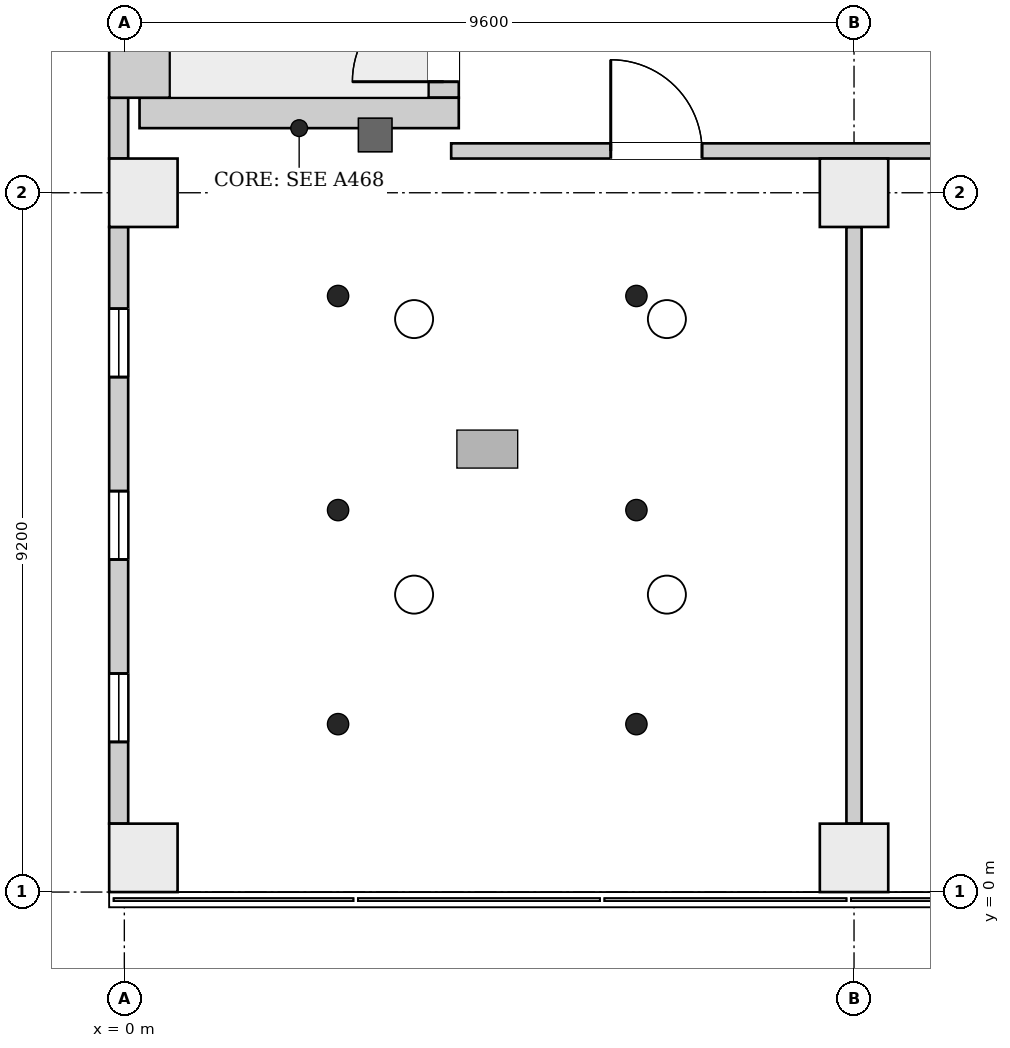
"""IFC4 building model, lengths in metres.
Left out: names, types, materials, properties, quantities, classifications, styles, units other than length and angle.
Written with IfcOpenShell. Run it as: python <this file> out.ifc"""

import sys

from ifc_helpers import new_model, si_unit, direction, frame, frame_2d, origin, origin_2d, place, context, subcontext, project, spatial, rectangle, extrude, element, fill, save


model = new_model("IFC4")
c1 = context("Model", 3, precision=1e-05, world=origin(), true_north=direction((0.0, 1.0)))
c2 = subcontext(c1, "Body", "Model", "MODEL_VIEW")
j1 = project(units=[si_unit("LENGTHUNIT", "METRE"), si_unit("PLANEANGLEUNIT", "RADIAN")], contexts=[c1])
p1 = place(None, origin())
s1 = spatial("IfcSite", under=j1, at=p1, CompositionType="ELEMENT")
p2 = place(p1, origin())
s2 = spatial("IfcBuilding", under=s1, at=p2, CompositionType="ELEMENT")
p3 = place(p2, frame((0.0, 0.0, 36.1)))
s3 = spatial("IfcBuildingStorey", under=s2, at=p3, CompositionType="ELEMENT", Elevation=36.1)
p4 = place(p3, frame((0.2, 10.25, 0.0), z_axis=(0.0, 0.0, 1.0), x_axis=(1.0, 0.0, 0.0)))
e1 = element("IfcWall", 1, at=p4, inside=s3, PredefinedType="SHEAR", context=c2, shape_type="SweptSolid", body=[
    extrude(rectangle(XDim=4.2, YDim=0.4, at=frame_2d((2.1, 0.0))), origin(), (0.0, 0.0, 1.0), 4.2),
])
p5 = place(p3, frame((0.2, 10.45, 0.0), z_axis=(0.0, 0.0, 1.0), x_axis=(0.0, 1.0, 0.0)))
e2 = element("IfcWall", 2, at=p5, inside=s3, PredefinedType="SHEAR", context=c2, shape_type="SweptSolid", body=[
    extrude(rectangle(XDim=6.6, YDim=0.8, at=frame_2d((3.3, 0.0))), origin(), (0.0, 0.0, 1.0), 4.2),
])
p6 = place(p3, frame((4.2, 10.45, 0.0), z_axis=(0.0, 0.0, 1.0), x_axis=(0.0, 1.0, 0.0)))
e3 = element("IfcWall", 3, at=p6, inside=s3, PredefinedType="SHEAR", context=c2, shape_type="SweptSolid", body=[
    extrude(rectangle(XDim=6.6, YDim=0.4, at=frame_2d((3.3, 0.0))), origin(), (0.0, 0.0, 1.0), 4.2),
])
p7 = place(p6, frame((0.21, 0.0, 0.0)))
e4 = element("IfcOpeningElement", 4, at=p7, cuts=e3, PredefinedType="OPENING", context=c2, shape_type="SweptSolid", body=[
    extrude(rectangle(XDim=1.2, YDim=2.1, at=frame_2d((0.6, 1.05))), frame((0.0, 0.21, 0.0), z_axis=(0.0, -1.0, 0.0), x_axis=(1.0, 0.0, 0.0)), (0.0, 0.0, 1.0), 0.42),
])
for number, where, z_axis, x_axis in (
    (5, (0.25, 0.45, 0.0), (0.0, 0.0, 1.0), (1.0, 0.0, 0.0)),
    (6, (9.6, 0.45, 0.0), (0.0, 0.0, 1.0), (1.0, 0.0, 0.0)),
    (7, (0.25, 9.2, 0.0), (0.0, 0.0, 1.0), (1.0, 0.0, 0.0)),
    (8, (9.6, 9.2, 0.0), (0.0, 0.0, 1.0), (1.0, 0.0, 0.0)),
):
    element("IfcColumn", number, at=place(p3, frame(where, z_axis=z_axis, x_axis=x_axis)), inside=s3, PredefinedType="COLUMN", context=c2, shape_type="SweptSolid", body=[
        extrude(rectangle(XDim=0.9, YDim=0.9, at=origin_2d()), origin(), (0.0, 0.0, 1.0), 4.2),
    ])
p8 = place(p3, frame((-0.074, 8.75, 0.0), z_axis=(0.0, 0.0, 1.0), x_axis=(0.0, -1.0, 0.0)))
e9 = element("IfcWall", 9, at=p8, inside=s3, PredefinedType="ELEMENTEDWALL", context=c2, shape_type="SweptSolid", body=[
    extrude(rectangle(XDim=7.85, YDim=0.25, at=frame_2d((3.925, 0.0))), origin(), (0.0, 0.0, 1.0), 3.9),
])
p9 = place(p8, frame((5.875, 0.0, 0.9)))
e10 = element("IfcOpeningElement", 10, at=p9, cuts=e9, PredefinedType="OPENING", context=c2, shape_type="SweptSolid", body=[
    extrude(rectangle(XDim=0.9, YDim=2.6, at=frame_2d((0.45, 1.3))), frame((0.0, 0.135, 0.0), z_axis=(0.0, -1.0, 0.0), x_axis=(1.0, 0.0, 0.0)), (0.0, 0.0, 1.0), 0.27),
])
p10 = place(p8, frame((3.475, 0.0, 0.9)))
e11 = element("IfcOpeningElement", 11, at=p10, cuts=e9, PredefinedType="OPENING", context=c2, shape_type="SweptSolid", body=[
    extrude(rectangle(XDim=0.9, YDim=2.6, at=frame_2d((0.45, 1.3))), frame((0.0, 0.135, 0.0), z_axis=(0.0, -1.0, 0.0), x_axis=(1.0, 0.0, 0.0)), (0.0, 0.0, 1.0), 0.27),
])
p11 = place(p8, frame((1.075, 0.0, 0.9)))
e12 = element("IfcOpeningElement", 12, at=p11, cuts=e9, PredefinedType="OPENING", context=c2, shape_type="SweptSolid", body=[
    extrude(rectangle(XDim=0.9, YDim=2.6, at=frame_2d((0.45, 1.3))), frame((0.0, 0.135, 0.0), z_axis=(0.0, -1.0, 0.0), x_axis=(1.0, 0.0, 0.0)), (0.0, 0.0, 1.0), 0.27),
])
p12 = place(p3, frame((-0.074, 10.45, 0.0), z_axis=(0.0, 0.0, 1.0), x_axis=(0.0, -1.0, 0.0)))
e13 = element("IfcWall", 13, at=p12, inside=s3, PredefinedType="ELEMENTEDWALL", context=c2, shape_type="SweptSolid", body=[
    extrude(rectangle(XDim=0.8, YDim=0.25, at=frame_2d((0.4, 0.0))), origin(), (0.0, 0.0, 1.0), 3.9),
])
p13 = place(p3, frame((4.3, 9.75, 0.0), z_axis=(0.0, 0.0, 1.0), x_axis=(1.0, 0.0, 0.0)))
e14 = element("IfcWall", 14, at=p13, inside=s3, PredefinedType="PARTITIONING", context=c2, shape_type="SweptSolid", body=[
    extrude(rectangle(XDim=43.894, YDim=0.2, at=frame_2d((21.947, 0.0))), origin(), (0.0, 0.0, 1.0), 3.9),
])
p14 = place(p13, frame((2.1, 0.0, 0.0)))
e15 = element("IfcOpeningElement", 15, at=p14, cuts=e14, PredefinedType="OPENING", context=c2, shape_type="SweptSolid", body=[
    extrude(rectangle(XDim=1.2, YDim=2.1, at=frame_2d((0.6, 1.05))), frame((0.0, 0.11, 0.0), z_axis=(0.0, -1.0, 0.0), x_axis=(1.0, 0.0, 0.0)), (0.0, 0.0, 1.0), 0.22),
])
p15 = place(p13, frame((9.5, 0.0, 0.0)))
e16 = element("IfcOpeningElement", 16, at=p15, cuts=e14, PredefinedType="OPENING", context=c2, shape_type="SweptSolid", body=[
    extrude(rectangle(XDim=1.2, YDim=2.1, at=frame_2d((0.6, 1.05))), frame((0.0, 0.11, 0.0), z_axis=(0.0, -1.0, 0.0), x_axis=(1.0, 0.0, 0.0)), (0.0, 0.0, 1.0), 0.22),
])
p16 = place(p13, frame((19.1, 0.0, 0.0)))
e17 = element("IfcOpeningElement", 17, at=p16, cuts=e14, PredefinedType="OPENING", context=c2, shape_type="SweptSolid", body=[
    extrude(rectangle(XDim=1.2, YDim=2.1, at=frame_2d((0.6, 1.05))), frame((0.0, 0.11, 0.0), z_axis=(0.0, -1.0, 0.0), x_axis=(1.0, 0.0, 0.0)), (0.0, 0.0, 1.0), 0.22),
])
p17 = place(p13, frame((28.7, 0.0, 0.0)))
e18 = element("IfcOpeningElement", 18, at=p17, cuts=e14, PredefinedType="OPENING", context=c2, shape_type="SweptSolid", body=[
    extrude(rectangle(XDim=1.2, YDim=2.1, at=frame_2d((0.6, 1.05))), frame((0.0, 0.11, 0.0), z_axis=(0.0, -1.0, 0.0), x_axis=(1.0, 0.0, 0.0)), (0.0, 0.0, 1.0), 0.22),
])
p18 = place(p13, frame((38.4, 0.0, 0.0)))
e19 = element("IfcOpeningElement", 19, at=p18, cuts=e14, PredefinedType="OPENING", context=c2, shape_type="SweptSolid", body=[
    extrude(rectangle(XDim=1.2, YDim=2.1, at=frame_2d((0.6, 1.05))), frame((0.0, 0.11, 0.0), z_axis=(0.0, -1.0, 0.0), x_axis=(1.0, 0.0, 0.0)), (0.0, 0.0, 1.0), 0.22),
])
p19 = place(p3, frame((9.6, 0.9, 0.0), z_axis=(0.0, 0.0, 1.0), x_axis=(0.0, 1.0, 0.0)))
e20 = element("IfcWall", 20, at=p19, inside=s3, PredefinedType="PARTITIONING", context=c2, shape_type="SweptSolid", body=[
    extrude(rectangle(XDim=7.85, YDim=0.2, at=frame_2d((3.925, 0.0))), origin(), (0.0, 0.0, 1.0), 3.9),
])
p20 = place(p9, origin())
e21 = element("IfcWindow", 21, at=p20, inside=s3, PartitioningType="SINGLE_PANEL", PredefinedType="WINDOW", context=c2, shape_type="SweptSolid", body=[
    extrude(rectangle(XDim=0.9, YDim=2.6, at=frame_2d((0.45, 1.3))), frame((0.0, 0.03, 0.0), z_axis=(0.0, -1.0, 0.0), x_axis=(1.0, 0.0, 0.0)), (0.0, 0.0, 1.0), 0.06),
])
fill(e10, e21)
p21 = place(p10, origin())
e22 = element("IfcWindow", 22, at=p21, inside=s3, PartitioningType="SINGLE_PANEL", PredefinedType="WINDOW", context=c2, shape_type="SweptSolid", body=[
    extrude(rectangle(XDim=0.9, YDim=2.6, at=frame_2d((0.45, 1.3))), frame((0.0, 0.03, 0.0), z_axis=(0.0, -1.0, 0.0), x_axis=(1.0, 0.0, 0.0)), (0.0, 0.0, 1.0), 0.06),
])
fill(e11, e22)
p22 = place(p11, origin())
e23 = element("IfcWindow", 23, at=p22, inside=s3, PartitioningType="SINGLE_PANEL", PredefinedType="WINDOW", context=c2, shape_type="SweptSolid", body=[
    extrude(rectangle(XDim=0.9, YDim=2.6, at=frame_2d((0.45, 1.3))), frame((0.0, 0.03, 0.0), z_axis=(0.0, -1.0, 0.0), x_axis=(1.0, 0.0, 0.0)), (0.0, 0.0, 1.0), 0.06),
])
fill(e12, e23)
p23 = place(p7, origin())
e24 = element("IfcDoor", 24, at=p23, inside=s3, OperationType="SINGLE_SWING_RIGHT", PredefinedType="DOOR", context=c2, shape_type="SweptSolid", body=[
    extrude(rectangle(XDim=1.2, YDim=2.1, at=frame_2d((0.6, 1.05))), frame((0.0, 0.025, 0.0), z_axis=(0.0, -1.0, 0.0), x_axis=(1.0, 0.0, 0.0)), (0.0, 0.0, 1.0), 0.05),
])
fill(e4, e24)
p24 = place(p14, origin())
e25 = element("IfcDoor", 25, at=p24, inside=s3, OperationType="SINGLE_SWING_RIGHT", PredefinedType="DOOR", context=c2, shape_type="SweptSolid", body=[
    extrude(rectangle(XDim=1.2, YDim=2.1, at=frame_2d((0.6, 1.05))), frame((0.0, 0.025, 0.0), z_axis=(0.0, -1.0, 0.0), x_axis=(1.0, 0.0, 0.0)), (0.0, 0.0, 1.0), 0.05),
])
fill(e15, e25)
save(model, sys.argv[1])
